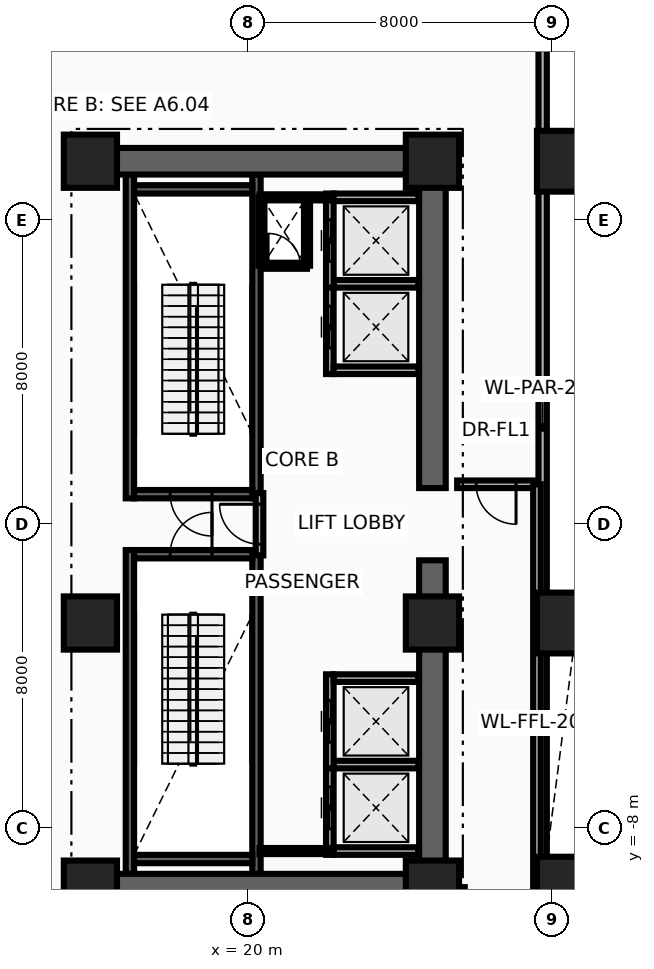
"""IFC4 building model, lengths in metres.
Left out: names, types, materials, properties, quantities, classifications, styles, units other than length and angle.
Written with IfcOpenShell. Run it as: python <this file> out.ifc"""

import sys

from ifc_helpers import new_model, si_unit, direction, frame, frame_2d, origin, origin_2d, place, context, subcontext, project, spatial, rectangle, extrude, source, transform, mapped, element, fill, save


model = new_model("IFC4")
c1 = context("Model", 3, precision=1e-05, world=origin(), true_north=direction((0.0, 1.0)))
c2 = subcontext(c1, "Body", "Model", "MODEL_VIEW")
j1 = project(units=[si_unit("LENGTHUNIT", "METRE"), si_unit("PLANEANGLEUNIT", "RADIAN")], contexts=[c1])
p1 = place(None, origin())
s1 = spatial("IfcSite", under=j1, at=p1, CompositionType="ELEMENT")
p2 = place(p1, origin())
s2 = spatial("IfcBuilding", under=s1, at=p2, CompositionType="ELEMENT")
p3 = place(p2, origin())
s3 = spatial("IfcBuildingStorey", under=s2, at=p3, CompositionType="ELEMENT", Elevation=0.0)
for number, where, z_axis, x_axis in (
    (1, (16.89, 0.68, 0.0), (0.0, 0.0, 1.0), (0.0, 1.0, 0.0)),
    (2, (20.22, 0.68, 0.0), (0.0, 0.0, 1.0), (0.0, 1.0, 0.0)),
):
    element("IfcWall", number, at=place(p3, frame(where, z_axis=z_axis, x_axis=x_axis)), inside=s3, PredefinedType="SHEAR", context=c2, shape_type="SweptSolid", body=[
        extrude(rectangle(XDim=8.52, YDim=0.22, at=frame_2d((4.26, 0.0))), origin(), (0.0, 0.0, 1.0), 4.92),
    ])
p4 = place(p3, frame((17.0, 0.79, 0.0), z_axis=(0.0, 0.0, 1.0), x_axis=(1.0, 0.0, 0.0)))
e3 = element("IfcWall", 3, at=p4, inside=s3, PredefinedType="SHEAR", context=c2, shape_type="SweptSolid", body=[
    extrude(rectangle(XDim=3.11, YDim=0.22, at=frame_2d((1.555, 0.0))), origin(), (0.0, 0.0, 1.0), 4.92),
])
p5 = place(p4, frame((0.95, 0.0, 0.0)))
e4 = element("IfcOpeningElement", 4, at=p5, cuts=e3, PredefinedType="OPENING", context=c2, shape_type="SweptSolid", body=[
    extrude(rectangle(XDim=1.1, YDim=2.15, at=frame_2d((0.55, 1.075))), frame((0.0, 0.125, 0.0), z_axis=(0.0, -1.0, 0.0), x_axis=(1.0, 0.0, 0.0)), (0.0, 0.0, 1.0), 0.25),
])
p6 = place(p3, frame((17.0, 8.81, 0.0), z_axis=(0.0, 0.0, 1.0), x_axis=(1.0, 0.0, 0.0)))
e5 = element("IfcWall", 5, at=p6, inside=s3, PredefinedType="SHEAR", context=c2, shape_type="SweptSolid", body=[
    extrude(rectangle(XDim=3.11, YDim=0.22, at=frame_2d((1.555, 0.0))), origin(), (0.0, 0.0, 1.0), 4.92),
])
for number, where, z_axis, x_axis in (
    (6, (16.89, -9.2, 0.0), (0.0, 0.0, 1.0), (0.0, 1.0, 0.0)),
    (7, (20.22, -9.2, 0.0), (0.0, 0.0, 1.0), (0.0, 1.0, 0.0)),
):
    element("IfcWall", number, at=place(p3, frame(where, z_axis=z_axis, x_axis=x_axis)), inside=s3, PredefinedType="SHEAR", context=c2, shape_type="SweptSolid", body=[
        extrude(rectangle(XDim=8.52, YDim=0.22, at=frame_2d((4.26, 0.0))), origin(), (0.0, 0.0, 1.0), 4.92),
    ])
p7 = place(p3, frame((17.0, -8.81, 0.0), z_axis=(0.0, 0.0, 1.0), x_axis=(1.0, 0.0, 0.0)))
e8 = element("IfcWall", 8, at=p7, inside=s3, PredefinedType="SHEAR", context=c2, shape_type="SweptSolid", body=[
    extrude(rectangle(XDim=3.11, YDim=0.22, at=frame_2d((1.555, 0.0))), origin(), (0.0, 0.0, 1.0), 4.92),
])
p8 = place(p3, frame((17.0, -0.79, 0.0), z_axis=(0.0, 0.0, 1.0), x_axis=(1.0, 0.0, 0.0)))
e9 = element("IfcWall", 9, at=p8, inside=s3, PredefinedType="SHEAR", context=c2, shape_type="SweptSolid", body=[
    extrude(rectangle(XDim=3.11, YDim=0.22, at=frame_2d((1.555, 0.0))), origin(), (0.0, 0.0, 1.0), 4.92),
])
p9 = place(p8, frame((0.95, 0.0, 0.0)))
e10 = element("IfcOpeningElement", 10, at=p9, cuts=e9, PredefinedType="OPENING", context=c2, shape_type="SweptSolid", body=[
    extrude(rectangle(XDim=1.1, YDim=2.15, at=frame_2d((0.55, 1.075))), frame((0.0, 0.125, 0.0), z_axis=(0.0, -1.0, 0.0), x_axis=(1.0, 0.0, 0.0)), (0.0, 0.0, 1.0), 0.25),
])
for number, where, z_axis, x_axis in (
    (11, (24.85, -9.9, 0.0), (0.0, 0.0, 1.0), (0.0, 1.0, 0.0)),
    (12, (24.85, 0.95, 0.0), (0.0, 0.0, 1.0), (0.0, 1.0, 0.0)),
):
    element("IfcWall", number, at=place(p3, frame(where, z_axis=z_axis, x_axis=x_axis)), inside=s3, PredefinedType="SHEAR", context=c2, shape_type="SweptSolid", body=[
        extrude(rectangle(XDim=8.95, YDim=0.7, at=frame_2d((4.475, 0.0))), origin(), (0.0, 0.0, 1.0), 4.92),
    ])
for number, where, z_axis, x_axis in (
    (13, (15.85, 9.55, 0.0), (0.0, 0.0, 1.0), (1.0, 0.0, 0.0)),
    (14, (15.85, -9.55, 0.0), (0.0, 0.0, 1.0), (1.0, 0.0, 0.0)),
):
    element("IfcWall", number, at=place(p3, frame(where, z_axis=z_axis, x_axis=x_axis)), inside=s3, PredefinedType="SHEAR", context=c2, shape_type="SweptSolid", body=[
        extrude(rectangle(XDim=9.0, YDim=0.7, at=frame_2d((4.5, 0.0))), origin(), (0.0, 0.0, 1.0), 4.92),
    ])
m1 = source(origin(), c2, "Body", "SweptSolid", [
    extrude(rectangle(XDim=1.4, YDim=1.4, at=origin_2d()), origin(), (0.0, 0.0, 1.0), 5.2),
])
for number, where, z_axis, x_axis in (
    (15, (15.85, -9.55, 0.0), (0.0, 0.0, 1.0), (1.0, 0.0, 0.0)),
    (16, (24.85, -9.55, 0.0), (0.0, 0.0, 1.0), (1.0, 0.0, 0.0)),
):
    element("IfcColumn", number, at=place(p3, frame(where, z_axis=z_axis, x_axis=x_axis)), inside=s3, PredefinedType="COLUMN", context=c2, shape_type="MappedRepresentation", body=[
        mapped(m1, transform((0.0, 0.0, 0.0), x_axis=(1.0, 0.0, 0.0), y_axis=(0.0, 1.0, 0.0), z_axis=(0.0, 0.0, 1.0), scale=1.0)),
    ])
m2 = source(origin(), c2, "Body", "SweptSolid", [
    extrude(rectangle(XDim=1.6, YDim=1.6, at=origin_2d()), origin(), (0.0, 0.0, 1.0), 5.2),
])
p10 = place(p3, frame((28.4, -9.55, 0.0), z_axis=(0.0, 0.0, 1.0), x_axis=(1.0, 0.0, 0.0)))
e17 = element("IfcColumn", 17, at=p10, inside=s3, PredefinedType="COLUMN", context=c2, shape_type="MappedRepresentation", body=[
    mapped(m2, transform((0.0, 0.0, 0.0), x_axis=(1.0, 0.0, 0.0), y_axis=(0.0, 1.0, 0.0), z_axis=(0.0, 0.0, 1.0), scale=1.0)),
])
for number, where, z_axis, x_axis in (
    (18, (15.85, -2.6, 0.0), (0.0, 0.0, 1.0), (1.0, 0.0, 0.0)),
    (19, (24.85, -2.6, 0.0), (0.0, 0.0, 1.0), (1.0, 0.0, 0.0)),
):
    element("IfcColumn", number, at=place(p3, frame(where, z_axis=z_axis, x_axis=x_axis)), inside=s3, PredefinedType="COLUMN", context=c2, shape_type="MappedRepresentation", body=[
        mapped(m1, transform((0.0, 0.0, 0.0), x_axis=(1.0, 0.0, 0.0), y_axis=(0.0, 1.0, 0.0), z_axis=(0.0, 0.0, 1.0), scale=1.0)),
    ])
p11 = place(p3, frame((28.4, -2.6, 0.0), z_axis=(0.0, 0.0, 1.0), x_axis=(1.0, 0.0, 0.0)))
e20 = element("IfcColumn", 20, at=p11, inside=s3, PredefinedType="COLUMN", context=c2, shape_type="MappedRepresentation", body=[
    mapped(m2, transform((0.0, 0.0, 0.0), x_axis=(1.0, 0.0, 0.0), y_axis=(0.0, 1.0, 0.0), z_axis=(0.0, 0.0, 1.0), scale=1.0)),
])
for number, where, z_axis, x_axis in (
    (21, (15.85, 9.55, 0.0), (0.0, 0.0, 1.0), (1.0, 0.0, 0.0)),
    (22, (24.85, 9.55, 0.0), (0.0, 0.0, 1.0), (1.0, 0.0, 0.0)),
):
    element("IfcColumn", number, at=place(p3, frame(where, z_axis=z_axis, x_axis=x_axis)), inside=s3, PredefinedType="COLUMN", context=c2, shape_type="MappedRepresentation", body=[
        mapped(m1, transform((0.0, 0.0, 0.0), x_axis=(1.0, 0.0, 0.0), y_axis=(0.0, 1.0, 0.0), z_axis=(0.0, 0.0, 1.0), scale=1.0)),
    ])
p12 = place(p3, frame((28.4, 9.55, 0.0), z_axis=(0.0, 0.0, 1.0), x_axis=(1.0, 0.0, 0.0)))
e23 = element("IfcColumn", 23, at=p12, inside=s3, PredefinedType="COLUMN", context=c2, shape_type="MappedRepresentation", body=[
    mapped(m2, transform((0.0, 0.0, 0.0), x_axis=(1.0, 0.0, 0.0), y_axis=(0.0, 1.0, 0.0), z_axis=(0.0, 0.0, 1.0), scale=1.0)),
])
p13 = place(p3, frame((27.75, -9.25, 0.0), z_axis=(0.0, 0.0, 1.0), x_axis=(0.0, 1.0, 0.0)))
e24 = element("IfcWall", 24, at=p13, inside=s3, PredefinedType="PARAPET", context=c2, shape_type="SweptSolid", body=[
    extrude(rectangle(XDim=23.6, YDim=0.22, at=frame_2d((11.8, 0.0))), origin(), (0.0, 0.0, 1.0), 1.35),
])
p14 = place(p3, frame((27.75, -9.25, 0.0), z_axis=(0.0, 0.0, 1.0), x_axis=(1.0, 0.0, 0.0)))
e25 = element("IfcWall", 25, at=p14, inside=s3, PredefinedType="PARAPET", context=c2, shape_type="SweptSolid", body=[
    extrude(rectangle(XDim=5.95, YDim=0.22, at=frame_2d((2.975, 0.0))), origin(), (0.0, 0.0, 1.0), 1.35),
])
p15 = place(p3, frame((22.15, -8.7, 0.0), z_axis=(0.0, 0.0, 1.0), x_axis=(0.0, 1.0, 0.0)))
e26 = element("IfcWall", 26, at=p15, inside=s3, PredefinedType="MOVABLE", context=c2, shape_type="SweptSolid", body=[
    extrude(rectangle(XDim=2.475, YDim=0.2, at=frame_2d((1.237, 0.0))), origin(), (0.0, 0.0, 1.0), 4.92),
])
p16 = place(p15, frame((0.688, 0.0, 0.0)))
e27 = element("IfcOpeningElement", 27, at=p16, cuts=e26, PredefinedType="OPENING", context=c2, shape_type="SweptSolid", body=[
    extrude(rectangle(XDim=1.1, YDim=2.1, at=frame_2d((0.55, 1.05))), frame((0.0, 0.115, 0.0), z_axis=(0.0, -1.0, 0.0), x_axis=(1.0, 0.0, 0.0)), (0.0, 0.0, 1.0), 0.23),
])
for number, where, z_axis, x_axis in (
    (28, (22.25, -8.6, 0.0), (0.0, 0.0, 1.0), (1.0, 0.0, 0.0)),
    (29, (22.25, -6.325, 0.0), (0.0, 0.0, 1.0), (1.0, 0.0, 0.0)),
):
    element("IfcWall", number, at=place(p3, frame(where, z_axis=z_axis, x_axis=x_axis)), inside=s3, PredefinedType="MOVABLE", context=c2, shape_type="SweptSolid", body=[
        extrude(rectangle(XDim=2.23, YDim=0.2, at=frame_2d((1.115, 0.0))), origin(), (0.0, 0.0, 1.0), 4.92),
    ])
p17 = place(p3, frame((22.15, -6.425, 0.0), z_axis=(0.0, 0.0, 1.0), x_axis=(0.0, 1.0, 0.0)))
e30 = element("IfcWall", 30, at=p17, inside=s3, PredefinedType="MOVABLE", context=c2, shape_type="SweptSolid", body=[
    extrude(rectangle(XDim=2.475, YDim=0.2, at=frame_2d((1.238, 0.0))), origin(), (0.0, 0.0, 1.0), 4.92),
])
p18 = place(p17, frame((0.688, 0.0, 0.0)))
e31 = element("IfcOpeningElement", 31, at=p18, cuts=e30, PredefinedType="OPENING", context=c2, shape_type="SweptSolid", body=[
    extrude(rectangle(XDim=1.1, YDim=2.1, at=frame_2d((0.55, 1.05))), frame((0.0, 0.115, 0.0), z_axis=(0.0, -1.0, 0.0), x_axis=(1.0, 0.0, 0.0)), (0.0, 0.0, 1.0), 0.23),
])
p19 = place(p3, frame((22.25, -4.05, 0.0), z_axis=(0.0, 0.0, 1.0), x_axis=(1.0, 0.0, 0.0)))
e32 = element("IfcWall", 32, at=p19, inside=s3, PredefinedType="MOVABLE", context=c2, shape_type="SweptSolid", body=[
    extrude(rectangle(XDim=2.23, YDim=0.2, at=frame_2d((1.115, 0.0))), origin(), (0.0, 0.0, 1.0), 4.92),
])
p20 = place(p3, frame((22.15, 3.95, 0.0), z_axis=(0.0, 0.0, 1.0), x_axis=(0.0, 1.0, 0.0)))
e33 = element("IfcWall", 33, at=p20, inside=s3, PredefinedType="MOVABLE", context=c2, shape_type="SweptSolid", body=[
    extrude(rectangle(XDim=2.475, YDim=0.2, at=frame_2d((1.238, 0.0))), origin(), (0.0, 0.0, 1.0), 4.92),
])
p21 = place(p20, frame((0.688, 0.0, 0.0)))
e34 = element("IfcOpeningElement", 34, at=p21, cuts=e33, PredefinedType="OPENING", context=c2, shape_type="SweptSolid", body=[
    extrude(rectangle(XDim=1.1, YDim=2.1, at=frame_2d((0.55, 1.05))), frame((0.0, 0.115, 0.0), z_axis=(0.0, -1.0, 0.0), x_axis=(1.0, 0.0, 0.0)), (0.0, 0.0, 1.0), 0.23),
])
for number, where, z_axis, x_axis in (
    (35, (22.25, 4.05, 0.0), (0.0, 0.0, 1.0), (1.0, 0.0, 0.0)),
    (36, (22.25, 6.325, 0.0), (0.0, 0.0, 1.0), (1.0, 0.0, 0.0)),
):
    element("IfcWall", number, at=place(p3, frame(where, z_axis=z_axis, x_axis=x_axis)), inside=s3, PredefinedType="MOVABLE", context=c2, shape_type="SweptSolid", body=[
        extrude(rectangle(XDim=2.23, YDim=0.2, at=frame_2d((1.115, 0.0))), origin(), (0.0, 0.0, 1.0), 3.745),
    ])
p22 = place(p3, frame((22.15, 6.225, 0.0), z_axis=(0.0, 0.0, 1.0), x_axis=(0.0, 1.0, 0.0)))
e37 = element("IfcWall", 37, at=p22, inside=s3, PredefinedType="MOVABLE", context=c2, shape_type="SweptSolid", body=[
    extrude(rectangle(XDim=2.475, YDim=0.2, at=frame_2d((1.237, 0.0))), origin(), (0.0, 0.0, 1.0), 4.92),
])
p23 = place(p22, frame((0.688, 0.0, 0.0)))
e38 = element("IfcOpeningElement", 38, at=p23, cuts=e37, PredefinedType="OPENING", context=c2, shape_type="SweptSolid", body=[
    extrude(rectangle(XDim=1.1, YDim=2.1, at=frame_2d((0.55, 1.05))), frame((0.0, 0.115, 0.0), z_axis=(0.0, -1.0, 0.0), x_axis=(1.0, 0.0, 0.0)), (0.0, 0.0, 1.0), 0.23),
])
p24 = place(p3, frame((22.25, 8.6, 0.0), z_axis=(0.0, 0.0, 1.0), x_axis=(1.0, 0.0, 0.0)))
e39 = element("IfcWall", 39, at=p24, inside=s3, PredefinedType="MOVABLE", context=c2, shape_type="SweptSolid", body=[
    extrude(rectangle(XDim=2.23, YDim=0.2, at=frame_2d((1.115, 0.0))), origin(), (0.0, 0.0, 1.0), 3.745),
])
p25 = place(p3, frame((20.3, -0.82, 0.0), z_axis=(0.0, 0.0, 1.0), x_axis=(0.0, 1.0, 0.0)))
e40 = element("IfcWall", 40, at=p25, inside=s3, PredefinedType="PARTITIONING", context=c2, shape_type="SweptSolid", body=[
    extrude(rectangle(XDim=1.64, YDim=0.2, at=frame_2d((0.82, 0.0))), origin(), (0.0, 0.0, 1.0), 4.92),
])
p26 = place(p25, frame((0.295, 0.0, 0.0)))
e41 = element("IfcOpeningElement", 41, at=p26, cuts=e40, PredefinedType="OPENING", context=c2, shape_type="SweptSolid", body=[
    extrude(rectangle(XDim=1.05, YDim=2.15, at=frame_2d((0.525, 1.075))), frame((0.0, 0.115, 0.0), z_axis=(0.0, -1.0, 0.0), x_axis=(1.0, 0.0, 0.0)), (0.0, 0.0, 1.0), 0.23),
])
p27 = place(p3, frame((20.35, 6.8, 0.0), z_axis=(0.0, 0.0, 1.0), x_axis=(1.0, 0.0, 0.0)))
e42 = element("IfcWall", 42, at=p27, inside=s3, PredefinedType="PARTITIONING", context=c2, shape_type="SweptSolid", body=[
    extrude(rectangle(XDim=1.2, YDim=0.16, at=frame_2d((0.6, 0.0))), origin(), (0.0, 0.0, 1.0), 4.92),
])
p28 = place(p27, frame((0.175, 0.0, 0.0)))
e43 = element("IfcOpeningElement", 43, at=p28, cuts=e42, PredefinedType="OPENING", context=c2, shape_type="SweptSolid", body=[
    extrude(rectangle(XDim=0.85, YDim=2.05, at=frame_2d((0.425, 1.025))), frame((0.0, 0.095, 0.0), z_axis=(0.0, -1.0, 0.0), x_axis=(1.0, 0.0, 0.0)), (0.0, 0.0, 1.0), 0.19),
])
for number, where, z_axis, x_axis in (
    (44, (21.55, 6.8, 0.0), (0.0, 0.0, 1.0), (0.0, 1.0, 0.0)),
    (45, (20.35, 6.8, 0.0), (0.0, 0.0, 1.0), (0.0, 1.0, 0.0)),
):
    element("IfcWall", number, at=place(p3, frame(where, z_axis=z_axis, x_axis=x_axis)), inside=s3, PredefinedType="PARTITIONING", context=c2, shape_type="SweptSolid", body=[
        extrude(rectangle(XDim=1.8, YDim=0.16, at=frame_2d((0.9, 0.0))), origin(), (0.0, 0.0, 1.0), 4.92),
    ])
for number, where, z_axis, x_axis in (
    (46, (20.3, -8.6, 0.0), (0.0, 0.0, 1.0), (1.0, 0.0, 0.0)),
    (47, (20.3, 8.6, 0.0), (0.0, 0.0, 1.0), (1.0, 0.0, 0.0)),
):
    element("IfcWall", number, at=place(p3, frame(where, z_axis=z_axis, x_axis=x_axis)), inside=s3, PredefinedType="PARTITIONING", context=c2, shape_type="SweptSolid", body=[
        extrude(rectangle(XDim=1.82, YDim=0.16, at=frame_2d((0.91, 0.0))), origin(), (0.0, 0.0, 1.0), 4.92),
    ])
p29 = place(p3, frame((25.5, 1.05, 0.0), z_axis=(0.0, 0.0, 1.0), x_axis=(1.0, 0.0, 0.0)))
e48 = element("IfcWall", 48, at=p29, inside=s3, PredefinedType="PARTITIONING", context=c2, shape_type="SweptSolid", body=[
    extrude(rectangle(XDim=2.1, YDim=0.2, at=frame_2d((1.05, 0.0))), origin(), (0.0, 0.0, 1.0), 4.92),
])
p30 = place(p29, frame((0.5, 0.0, 0.0)))
e49 = element("IfcOpeningElement", 49, at=p30, cuts=e48, PredefinedType="OPENING", context=c2, shape_type="SweptSolid", body=[
    extrude(rectangle(XDim=1.05, YDim=2.15, at=frame_2d((0.525, 1.075))), frame((0.0, 0.115, 0.0), z_axis=(0.0, -1.0, 0.0), x_axis=(1.0, 0.0, 0.0)), (0.0, 0.0, 1.0), 0.23),
])
p31 = place(p3, frame((25.6, -22.74, 0.0), z_axis=(0.0, 0.0, 1.0), x_axis=(0.0, 1.0, 0.0)))
e50 = element("IfcWall", 50, at=p31, inside=s3, PredefinedType="PARTITIONING", context=c2, shape_type="SweptSolid", body=[
    extrude(rectangle(XDim=13.19, YDim=0.2, at=frame_2d((6.595, 0.0))), origin(), (0.0, 0.0, 1.0), 3.957),
])
p32 = place(p3, frame((27.6, -11.5, 0.0), z_axis=(0.0, 0.0, 1.0), x_axis=(0.0, 1.0, 0.0)))
e51 = element("IfcWall", 51, at=p32, inside=s3, PredefinedType="PARTITIONING", context=c2, shape_type="SweptSolid", body=[
    extrude(rectangle(XDim=12.55, YDim=0.2, at=frame_2d((6.275, 0.0))), origin(), (0.0, 0.0, 1.0), 3.957),
])
p33 = place(p16, origin())
e52 = element("IfcDoor", 52, at=p33, inside=s3, OperationType="DOUBLE_DOOR_SLIDING", PredefinedType="DOOR", context=c2, shape_type="SweptSolid", body=[
    extrude(rectangle(XDim=1.1, YDim=2.1, at=frame_2d((0.55, 1.05))), frame((0.0, 0.025, 0.0), z_axis=(0.0, -1.0, 0.0), x_axis=(1.0, 0.0, 0.0)), (0.0, 0.0, 1.0), 0.05),
])
fill(e27, e52)
p34 = place(p18, origin())
e53 = element("IfcDoor", 53, at=p34, inside=s3, OperationType="DOUBLE_DOOR_SLIDING", PredefinedType="DOOR", context=c2, shape_type="SweptSolid", body=[
    extrude(rectangle(XDim=1.1, YDim=2.1, at=frame_2d((0.55, 1.05))), frame((0.0, 0.025, 0.0), z_axis=(0.0, -1.0, 0.0), x_axis=(1.0, 0.0, 0.0)), (0.0, 0.0, 1.0), 0.05),
])
fill(e31, e53)
p35 = place(p21, origin())
e54 = element("IfcDoor", 54, at=p35, inside=s3, OperationType="DOUBLE_DOOR_SLIDING", PredefinedType="DOOR", context=c2, shape_type="SweptSolid", body=[
    extrude(rectangle(XDim=1.1, YDim=2.1, at=frame_2d((0.55, 1.05))), frame((0.0, 0.025, 0.0), z_axis=(0.0, -1.0, 0.0), x_axis=(1.0, 0.0, 0.0)), (0.0, 0.0, 1.0), 0.05),
])
fill(e34, e54)
p36 = place(p23, origin())
e55 = element("IfcDoor", 55, at=p36, inside=s3, OperationType="DOUBLE_DOOR_SLIDING", PredefinedType="DOOR", context=c2, shape_type="SweptSolid", body=[
    extrude(rectangle(XDim=1.1, YDim=2.1, at=frame_2d((0.55, 1.05))), frame((0.0, 0.025, 0.0), z_axis=(0.0, -1.0, 0.0), x_axis=(1.0, 0.0, 0.0)), (0.0, 0.0, 1.0), 0.05),
])
fill(e38, e55)
p37 = place(p26, origin())
e56 = element("IfcDoor", 56, at=p37, inside=s3, OperationType="SINGLE_SWING_RIGHT", PredefinedType="DOOR", context=c2, shape_type="SweptSolid", body=[
    extrude(rectangle(XDim=1.05, YDim=2.15, at=frame_2d((0.525, 1.075))), frame((0.0, 0.025, 0.0), z_axis=(0.0, -1.0, 0.0), x_axis=(1.0, 0.0, 0.0)), (0.0, 0.0, 1.0), 0.05),
])
fill(e41, e56)
p38 = place(p5, frame((1.1, 0.0, 0.0), z_axis=(0.0, 0.0, 1.0), x_axis=(-1.0, 0.0, 0.0)))
e57 = element("IfcDoor", 57, at=p38, inside=s3, OperationType="SINGLE_SWING_LEFT", PredefinedType="DOOR", context=c2, shape_type="SweptSolid", body=[
    extrude(rectangle(XDim=1.1, YDim=2.15, at=frame_2d((0.55, 1.075))), frame((0.0, 0.025, 0.0), z_axis=(0.0, -1.0, 0.0), x_axis=(1.0, 0.0, 0.0)), (0.0, 0.0, 1.0), 0.05),
])
fill(e4, e57)
p39 = place(p9, origin())
e58 = element("IfcDoor", 58, at=p39, inside=s3, OperationType="SINGLE_SWING_RIGHT", PredefinedType="DOOR", context=c2, shape_type="SweptSolid", body=[
    extrude(rectangle(XDim=1.1, YDim=2.15, at=frame_2d((0.55, 1.075))), frame((0.0, 0.025, 0.0), z_axis=(0.0, -1.0, 0.0), x_axis=(1.0, 0.0, 0.0)), (0.0, 0.0, 1.0), 0.05),
])
fill(e10, e58)
p40 = place(p28, origin())
e59 = element("IfcDoor", 59, at=p40, inside=s3, OperationType="SINGLE_SWING_LEFT", PredefinedType="DOOR", context=c2, shape_type="SweptSolid", body=[
    extrude(rectangle(XDim=0.85, YDim=2.05, at=frame_2d((0.425, 1.025))), frame((0.0, 0.025, 0.0), z_axis=(0.0, -1.0, 0.0), x_axis=(1.0, 0.0, 0.0)), (0.0, 0.0, 1.0), 0.05),
])
fill(e43, e59)
p41 = place(p30, frame((1.05, 0.0, 0.0), z_axis=(0.0, 0.0, 1.0), x_axis=(-1.0, 0.0, 0.0)))
e60 = element("IfcDoor", 60, at=p41, inside=s3, OperationType="SINGLE_SWING_RIGHT", PredefinedType="DOOR", context=c2, shape_type="SweptSolid", body=[
    extrude(rectangle(XDim=1.05, YDim=2.15, at=frame_2d((0.525, 1.075))), frame((0.0, 0.025, 0.0), z_axis=(0.0, -1.0, 0.0), x_axis=(1.0, 0.0, 0.0)), (0.0, 0.0, 1.0), 0.05),
])
fill(e49, e60)
save(model, sys.argv[1])
